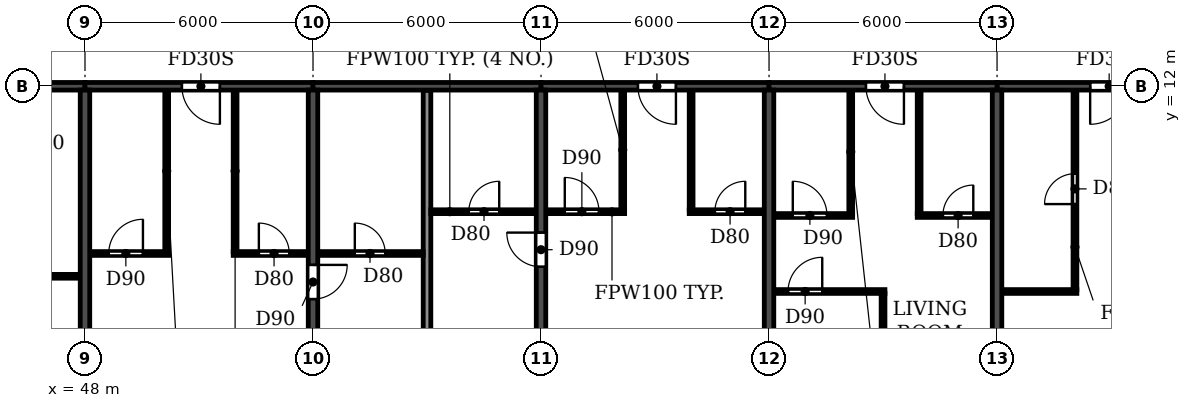
"""IFC4 building model, lengths in metres.
Left out: names, types, materials, properties, quantities, classifications, styles, units other than length and angle.
Written with IfcOpenShell. Run it as: python <this file> out.ifc"""

import sys

from ifc_helpers import new_model, si_unit, direction, frame, frame_2d, origin, place, context, subcontext, project, spatial, rectangle, extrude, element, fill, save


model = new_model("IFC4")
c1 = context("Model", 3, precision=1e-05, world=origin(), true_north=direction((0.0, 1.0)))
c2 = subcontext(c1, "Body", "Model", "MODEL_VIEW")
j1 = project(units=[si_unit("LENGTHUNIT", "METRE"), si_unit("PLANEANGLEUNIT", "RADIAN")], contexts=[c1])
p1 = place(None, origin())
s1 = spatial("IfcSite", under=j1, at=p1, CompositionType="ELEMENT")
p2 = place(p1, origin())
s2 = spatial("IfcBuilding", under=s1, at=p2, CompositionType="ELEMENT")
p3 = place(p2, frame((0.0, 0.0, 257.7)))
s3 = spatial("IfcBuildingStorey", under=s2, at=p3, CompositionType="ELEMENT", Elevation=257.7)
p4 = place(p3, frame((48.0, 0.2, 0.0), z_axis=(0.0, 0.0, 1.0), x_axis=(0.0, 1.0, 0.0)))
e1 = element("IfcWall", 1, at=p4, inside=s3, PredefinedType="SHEAR", context=c2, shape_type="SweptSolid", body=[
    extrude(rectangle(XDim=11.7, YDim=0.25, at=frame_2d((5.85, 0.0))), origin(), (0.0, 0.0, 1.0), 3.0),
])
p5 = place(p3, frame((54.0, 0.2, 0.0), z_axis=(0.0, 0.0, 1.0), x_axis=(0.0, 1.0, 0.0)))
e2 = element("IfcWall", 2, at=p5, inside=s3, PredefinedType="SHEAR", context=c2, shape_type="SweptSolid", body=[
    extrude(rectangle(XDim=11.7, YDim=0.25, at=frame_2d((5.85, 0.0))), origin(), (0.0, 0.0, 1.0), 3.0),
])
p6 = place(p5, frame((6.2, 0.0, 0.0)))
e3 = element("IfcOpeningElement", 3, at=p6, cuts=e2, PredefinedType="OPENING", context=c2, shape_type="SweptSolid", body=[
    extrude(rectangle(XDim=0.9, YDim=2.1, at=frame_2d((0.45, 1.05))), frame((0.0, 0.135, 0.0), z_axis=(0.0, -1.0, 0.0), x_axis=(1.0, 0.0, 0.0)), (0.0, 0.0, 1.0), 0.27),
])
p7 = place(p3, frame((60.0, 0.2, 0.0), z_axis=(0.0, 0.0, 1.0), x_axis=(0.0, 1.0, 0.0)))
e4 = element("IfcWall", 4, at=p7, inside=s3, PredefinedType="SHEAR", context=c2, shape_type="SweptSolid", body=[
    extrude(rectangle(XDim=11.7, YDim=0.25, at=frame_2d((5.85, 0.0))), origin(), (0.0, 0.0, 1.0), 3.0),
])
p8 = place(p7, frame((7.05, 0.0, 0.0)))
e5 = element("IfcOpeningElement", 5, at=p8, cuts=e4, PredefinedType="OPENING", context=c2, shape_type="SweptSolid", body=[
    extrude(rectangle(XDim=0.9, YDim=2.1, at=frame_2d((0.45, 1.05))), frame((0.0, 0.135, 0.0), z_axis=(0.0, -1.0, 0.0), x_axis=(1.0, 0.0, 0.0)), (0.0, 0.0, 1.0), 0.27),
])
for number, where, z_axis, x_axis in (
    (6, (66.0, 0.2, 0.0), (0.0, 0.0, 1.0), (0.0, 1.0, 0.0)),
    (7, (72.0, 0.2, 0.0), (0.0, 0.0, 1.0), (0.0, 1.0, 0.0)),
):
    element("IfcWall", number, at=place(p3, frame(where, z_axis=z_axis, x_axis=x_axis)), inside=s3, PredefinedType="SHEAR", context=c2, shape_type="SweptSolid", body=[
        extrude(rectangle(XDim=11.7, YDim=0.25, at=frame_2d((5.85, 0.0))), origin(), (0.0, 0.0, 1.0), 3.0),
    ])
p9 = place(p3, frame((42.0, 12.0, 0.0), z_axis=(0.0, 0.0, 1.0), x_axis=(1.0, 0.0, 0.0)))
e8 = element("IfcWall", 8, at=p9, inside=s3, PredefinedType="SHEAR", context=c2, shape_type="SweptSolid", body=[
    extrude(rectangle(XDim=6.0, YDim=0.2, at=frame_2d((3.0, 0.0))), origin(), (0.0, 0.0, 1.0), 2.4),
])
p10 = place(p9, frame((2.55, 0.0, 0.0)))
e9 = element("IfcOpeningElement", 9, at=p10, cuts=e8, PredefinedType="OPENING", context=c2, shape_type="SweptSolid", body=[
    extrude(rectangle(XDim=1.0, YDim=2.1, at=frame_2d((0.5, 1.05))), frame((0.0, 0.11, 0.0), z_axis=(0.0, -1.0, 0.0), x_axis=(1.0, 0.0, 0.0)), (0.0, 0.0, 1.0), 0.22),
])
p11 = place(p3, frame((48.0, 12.0, 0.0), z_axis=(0.0, 0.0, 1.0), x_axis=(1.0, 0.0, 0.0)))
e10 = element("IfcWall", 10, at=p11, inside=s3, PredefinedType="SHEAR", context=c2, shape_type="SweptSolid", body=[
    extrude(rectangle(XDim=6.0, YDim=0.2, at=frame_2d((3.0, 0.0))), origin(), (0.0, 0.0, 1.0), 2.4),
])
p12 = place(p11, frame((2.55, 0.0, 0.0)))
e11 = element("IfcOpeningElement", 11, at=p12, cuts=e10, PredefinedType="OPENING", context=c2, shape_type="SweptSolid", body=[
    extrude(rectangle(XDim=1.0, YDim=2.1, at=frame_2d((0.5, 1.05))), frame((0.0, 0.11, 0.0), z_axis=(0.0, -1.0, 0.0), x_axis=(1.0, 0.0, 0.0)), (0.0, 0.0, 1.0), 0.22),
])
p13 = place(p3, frame((54.0, 12.0, 0.0), z_axis=(0.0, 0.0, 1.0), x_axis=(1.0, 0.0, 0.0)))
e12 = element("IfcWall", 12, at=p13, inside=s3, PredefinedType="SHEAR", context=c2, shape_type="SweptSolid", body=[
    extrude(rectangle(XDim=6.0, YDim=0.2, at=frame_2d((3.0, 0.0))), origin(), (0.0, 0.0, 1.0), 2.4),
])
p14 = place(p3, frame((60.0, 12.0, 0.0), z_axis=(0.0, 0.0, 1.0), x_axis=(1.0, 0.0, 0.0)))
e13 = element("IfcWall", 13, at=p14, inside=s3, PredefinedType="SHEAR", context=c2, shape_type="SweptSolid", body=[
    extrude(rectangle(XDim=6.0, YDim=0.2, at=frame_2d((3.0, 0.0))), origin(), (0.0, 0.0, 1.0), 2.4),
])
p15 = place(p14, frame((2.55, 0.0, 0.0)))
e14 = element("IfcOpeningElement", 14, at=p15, cuts=e13, PredefinedType="OPENING", context=c2, shape_type="SweptSolid", body=[
    extrude(rectangle(XDim=1.0, YDim=2.1, at=frame_2d((0.5, 1.05))), frame((0.0, 0.11, 0.0), z_axis=(0.0, -1.0, 0.0), x_axis=(1.0, 0.0, 0.0)), (0.0, 0.0, 1.0), 0.22),
])
p16 = place(p3, frame((66.0, 12.0, 0.0), z_axis=(0.0, 0.0, 1.0), x_axis=(1.0, 0.0, 0.0)))
e15 = element("IfcWall", 15, at=p16, inside=s3, PredefinedType="SHEAR", context=c2, shape_type="SweptSolid", body=[
    extrude(rectangle(XDim=6.0, YDim=0.2, at=frame_2d((3.0, 0.0))), origin(), (0.0, 0.0, 1.0), 2.4),
])
p17 = place(p16, frame((2.55, 0.0, 0.0)))
e16 = element("IfcOpeningElement", 16, at=p17, cuts=e15, PredefinedType="OPENING", context=c2, shape_type="SweptSolid", body=[
    extrude(rectangle(XDim=1.0, YDim=2.1, at=frame_2d((0.5, 1.05))), frame((0.0, 0.11, 0.0), z_axis=(0.0, -1.0, 0.0), x_axis=(1.0, 0.0, 0.0)), (0.0, 0.0, 1.0), 0.22),
])
p18 = place(p3, frame((72.0, 12.0, 0.0), z_axis=(0.0, 0.0, 1.0), x_axis=(1.0, 0.0, 0.0)))
e17 = element("IfcWall", 17, at=p18, inside=s3, PredefinedType="SHEAR", context=c2, shape_type="SweptSolid", body=[
    extrude(rectangle(XDim=6.0, YDim=0.2, at=frame_2d((3.0, 0.0))), origin(), (0.0, 0.0, 1.0), 2.4),
])
p19 = place(p18, frame((2.45, 0.0, 0.0)))
e18 = element("IfcOpeningElement", 18, at=p19, cuts=e17, PredefinedType="OPENING", context=c2, shape_type="SweptSolid", body=[
    extrude(rectangle(XDim=1.0, YDim=2.1, at=frame_2d((0.5, 1.05))), frame((0.0, 0.11, 0.0), z_axis=(0.0, -1.0, 0.0), x_axis=(1.0, 0.0, 0.0)), (0.0, 0.0, 1.0), 0.22),
])
p20 = place(p3, frame((57.0, 0.06, 0.0), z_axis=(0.0, 0.0, 1.0), x_axis=(0.0, 1.0, 0.0)))
e19 = element("IfcWall", 19, at=p20, inside=s3, PredefinedType="PARTITIONING", context=c2, shape_type="SweptSolid", body=[
    extrude(rectangle(XDim=11.83, YDim=0.2, at=frame_2d((5.915, 0.0))), origin(), (0.0, 0.0, 1.0), 3.0),
])
p21 = place(p3, frame((66.135, 6.6, 0.0), z_axis=(0.0, 0.0, 1.0), x_axis=(1.0, 0.0, 0.0)))
e20 = element("IfcWall", 20, at=p21, inside=s3, PredefinedType="PARTITIONING", context=c2, shape_type="SweptSolid", body=[
    extrude(rectangle(XDim=2.915, YDim=0.1, at=frame_2d((1.458, 0.0))), origin(), (0.0, 0.0, 1.0), 3.0),
])
p22 = place(p21, frame((0.365, 0.0, 0.0)))
e21 = element("IfcOpeningElement", 21, at=p22, cuts=e20, PredefinedType="OPENING", context=c2, shape_type="SweptSolid", body=[
    extrude(rectangle(XDim=0.9, YDim=2.1, at=frame_2d((0.45, 1.05))), frame((0.0, 0.06, 0.0), z_axis=(0.0, -1.0, 0.0), x_axis=(1.0, 0.0, 0.0)), (0.0, 0.0, 1.0), 0.12),
])
for number, where, z_axis, x_axis in (
    (22, (72.135, 6.6, 0.0), (0.0, 0.0, 1.0), (1.0, 0.0, 0.0)),
    (23, (45.9, 7.0, 0.0), (0.0, 0.0, 1.0), (1.0, 0.0, 0.0)),
):
    element("IfcWall", number, at=place(p3, frame(where, z_axis=z_axis, x_axis=x_axis)), inside=s3, PredefinedType="PARTITIONING", context=c2, shape_type="SweptSolid", body=[
        extrude(rectangle(XDim=1.965, YDim=0.1, at=frame_2d((0.982, 0.0))), origin(), (0.0, 0.0, 1.0), 3.0),
    ])
p23 = place(p3, frame((48.135, 7.6, 0.0), z_axis=(0.0, 0.0, 1.0), x_axis=(1.0, 0.0, 0.0)))
e24 = element("IfcWall", 24, at=p23, inside=s3, PredefinedType="PARTITIONING", context=c2, shape_type="SweptSolid", body=[
    extrude(rectangle(XDim=2.065, YDim=0.1, at=frame_2d((1.032, 0.0))), origin(), (0.0, 0.0, 1.0), 3.0),
])
p24 = place(p23, frame((0.49, 0.0, 0.0)))
e25 = element("IfcOpeningElement", 25, at=p24, cuts=e24, PredefinedType="OPENING", context=c2, shape_type="SweptSolid", body=[
    extrude(rectangle(XDim=0.9, YDim=2.1, at=frame_2d((0.45, 1.05))), frame((0.0, 0.06, 0.0), z_axis=(0.0, -1.0, 0.0), x_axis=(1.0, 0.0, 0.0)), (0.0, 0.0, 1.0), 0.12),
])
p25 = place(p3, frame((51.9, 7.6, 0.0), z_axis=(0.0, 0.0, 1.0), x_axis=(1.0, 0.0, 0.0)))
e26 = element("IfcWall", 26, at=p25, inside=s3, PredefinedType="PARTITIONING", context=c2, shape_type="SweptSolid", body=[
    extrude(rectangle(XDim=1.965, YDim=0.1, at=frame_2d((0.982, 0.0))), origin(), (0.0, 0.0, 1.0), 3.0),
])
p26 = place(p25, frame((0.675, 0.0, 0.0)))
e27 = element("IfcOpeningElement", 27, at=p26, cuts=e26, PredefinedType="OPENING", context=c2, shape_type="SweptSolid", body=[
    extrude(rectangle(XDim=0.8, YDim=2.1, at=frame_2d((0.4, 1.05))), frame((0.0, 0.06, 0.0), z_axis=(0.0, -1.0, 0.0), x_axis=(1.0, 0.0, 0.0)), (0.0, 0.0, 1.0), 0.12),
])
p27 = place(p3, frame((54.135, 7.6, 0.0), z_axis=(0.0, 0.0, 1.0), x_axis=(1.0, 0.0, 0.0)))
e28 = element("IfcWall", 28, at=p27, inside=s3, PredefinedType="PARTITIONING", context=c2, shape_type="SweptSolid", body=[
    extrude(rectangle(XDim=2.765, YDim=0.1, at=frame_2d((1.382, 0.0))), origin(), (0.0, 0.0, 1.0), 3.0),
])
p28 = place(p27, frame((0.965, 0.0, 0.0)))
e29 = element("IfcOpeningElement", 29, at=p28, cuts=e28, PredefinedType="OPENING", context=c2, shape_type="SweptSolid", body=[
    extrude(rectangle(XDim=0.8, YDim=2.1, at=frame_2d((0.4, 1.05))), frame((0.0, 0.06, 0.0), z_axis=(0.0, -1.0, 0.0), x_axis=(1.0, 0.0, 0.0)), (0.0, 0.0, 1.0), 0.12),
])
p29 = place(p3, frame((66.135, 8.6, 0.0), z_axis=(0.0, 0.0, 1.0), x_axis=(1.0, 0.0, 0.0)))
e30 = element("IfcWall", 30, at=p29, inside=s3, PredefinedType="PARTITIONING", context=c2, shape_type="SweptSolid", body=[
    extrude(rectangle(XDim=2.065, YDim=0.1, at=frame_2d((1.032, 0.0))), origin(), (0.0, 0.0, 1.0), 3.0),
])
p30 = place(p29, frame((0.49, 0.0, 0.0)))
e31 = element("IfcOpeningElement", 31, at=p30, cuts=e30, PredefinedType="OPENING", context=c2, shape_type="SweptSolid", body=[
    extrude(rectangle(XDim=0.9, YDim=2.1, at=frame_2d((0.45, 1.05))), frame((0.0, 0.06, 0.0), z_axis=(0.0, -1.0, 0.0), x_axis=(1.0, 0.0, 0.0)), (0.0, 0.0, 1.0), 0.12),
])
p31 = place(p3, frame((69.9, 8.6, 0.0), z_axis=(0.0, 0.0, 1.0), x_axis=(1.0, 0.0, 0.0)))
e32 = element("IfcWall", 32, at=p31, inside=s3, PredefinedType="PARTITIONING", context=c2, shape_type="SweptSolid", body=[
    extrude(rectangle(XDim=1.965, YDim=0.1, at=frame_2d((0.982, 0.0))), origin(), (0.0, 0.0, 1.0), 3.0),
])
p32 = place(p31, frame((0.675, 0.0, 0.0)))
e33 = element("IfcOpeningElement", 33, at=p32, cuts=e32, PredefinedType="OPENING", context=c2, shape_type="SweptSolid", body=[
    extrude(rectangle(XDim=0.8, YDim=2.1, at=frame_2d((0.4, 1.05))), frame((0.0, 0.06, 0.0), z_axis=(0.0, -1.0, 0.0), x_axis=(1.0, 0.0, 0.0)), (0.0, 0.0, 1.0), 0.12),
])
p33 = place(p3, frame((57.1, 8.7, 0.0), z_axis=(0.0, 0.0, 1.0), x_axis=(1.0, 0.0, 0.0)))
e34 = element("IfcWall", 34, at=p33, inside=s3, PredefinedType="PARTITIONING", context=c2, shape_type="SweptSolid", body=[
    extrude(rectangle(XDim=2.765, YDim=0.1, at=frame_2d((1.382, 0.0))), origin(), (0.0, 0.0, 1.0), 3.0),
])
p34 = place(p33, frame((1.0, 0.0, 0.0)))
e35 = element("IfcOpeningElement", 35, at=p34, cuts=e34, PredefinedType="OPENING", context=c2, shape_type="SweptSolid", body=[
    extrude(rectangle(XDim=0.8, YDim=2.1, at=frame_2d((0.4, 1.05))), frame((0.0, 0.06, 0.0), z_axis=(0.0, -1.0, 0.0), x_axis=(1.0, 0.0, 0.0)), (0.0, 0.0, 1.0), 0.12),
])
p35 = place(p3, frame((60.135, 8.7, 0.0), z_axis=(0.0, 0.0, 1.0), x_axis=(1.0, 0.0, 0.0)))
e36 = element("IfcWall", 36, at=p35, inside=s3, PredefinedType="PARTITIONING", context=c2, shape_type="SweptSolid", body=[
    extrude(rectangle(XDim=2.065, YDim=0.1, at=frame_2d((1.032, 0.0))), origin(), (0.0, 0.0, 1.0), 3.0),
])
p36 = place(p35, frame((0.49, 0.0, 0.0)))
e37 = element("IfcOpeningElement", 37, at=p36, cuts=e36, PredefinedType="OPENING", context=c2, shape_type="SweptSolid", body=[
    extrude(rectangle(XDim=0.9, YDim=2.1, at=frame_2d((0.45, 1.05))), frame((0.0, 0.06, 0.0), z_axis=(0.0, -1.0, 0.0), x_axis=(1.0, 0.0, 0.0)), (0.0, 0.0, 1.0), 0.12),
])
p37 = place(p3, frame((63.9, 8.7, 0.0), z_axis=(0.0, 0.0, 1.0), x_axis=(1.0, 0.0, 0.0)))
e38 = element("IfcWall", 38, at=p37, inside=s3, PredefinedType="PARTITIONING", context=c2, shape_type="SweptSolid", body=[
    extrude(rectangle(XDim=1.965, YDim=0.1, at=frame_2d((0.982, 0.0))), origin(), (0.0, 0.0, 1.0), 3.0),
])
p38 = place(p37, frame((0.675, 0.0, 0.0)))
e39 = element("IfcOpeningElement", 39, at=p38, cuts=e38, PredefinedType="OPENING", context=c2, shape_type="SweptSolid", body=[
    extrude(rectangle(XDim=0.8, YDim=2.1, at=frame_2d((0.4, 1.05))), frame((0.0, 0.06, 0.0), z_axis=(0.0, -1.0, 0.0), x_axis=(1.0, 0.0, 0.0)), (0.0, 0.0, 1.0), 0.12),
])
for number, where, z_axis, x_axis in (
    (40, (50.15, 7.65, 0.0), (0.0, 0.0, 1.0), (0.0, 1.0, 0.0)),
    (41, (51.95, 7.65, 0.0), (0.0, 0.0, 1.0), (0.0, 1.0, 0.0)),
):
    element("IfcWall", number, at=place(p3, frame(where, z_axis=z_axis, x_axis=x_axis)), inside=s3, PredefinedType="PARTITIONING", context=c2, shape_type="SweptSolid", body=[
        extrude(rectangle(XDim=4.24, YDim=0.1, at=frame_2d((2.12, 0.0))), origin(), (0.0, 0.0, 1.0), 3.0),
    ])
for number, where, z_axis, x_axis in (
    (42, (62.15, 8.75, 0.0), (0.0, 0.0, 1.0), (0.0, 1.0, 0.0)),
    (43, (63.95, 8.75, 0.0), (0.0, 0.0, 1.0), (0.0, 1.0, 0.0)),
):
    element("IfcWall", number, at=place(p3, frame(where, z_axis=z_axis, x_axis=x_axis)), inside=s3, PredefinedType="PARTITIONING", context=c2, shape_type="SweptSolid", body=[
        extrude(rectangle(XDim=3.14, YDim=0.1, at=frame_2d((1.57, 0.0))), origin(), (0.0, 0.0, 1.0), 3.0),
    ])
p39 = place(p3, frame((68.15, 8.65, 0.0), z_axis=(0.0, 0.0, 1.0), x_axis=(0.0, 1.0, 0.0)))
e44 = element("IfcWall", 44, at=p39, inside=s3, PredefinedType="PARTITIONING", context=c2, shape_type="SweptSolid", body=[
    extrude(rectangle(XDim=3.24, YDim=0.1, at=frame_2d((1.62, 0.0))), origin(), (0.0, 0.0, 1.0), 3.0),
])
p40 = place(p3, frame((69.0, 0.06, 0.0), z_axis=(0.0, 0.0, 1.0), x_axis=(0.0, 1.0, 0.0)))
e45 = element("IfcWall", 45, at=p40, inside=s3, PredefinedType="PARTITIONING", context=c2, shape_type="SweptSolid", body=[
    extrude(rectangle(XDim=6.49, YDim=0.1, at=frame_2d((3.245, 0.0))), origin(), (0.0, 0.0, 1.0), 3.0),
])
p41 = place(p3, frame((69.95, 8.65, 0.0), z_axis=(0.0, 0.0, 1.0), x_axis=(0.0, 1.0, 0.0)))
e46 = element("IfcWall", 46, at=p41, inside=s3, PredefinedType="PARTITIONING", context=c2, shape_type="SweptSolid", body=[
    extrude(rectangle(XDim=3.24, YDim=0.1, at=frame_2d((1.62, 0.0))), origin(), (0.0, 0.0, 1.0), 3.0),
])
p42 = place(p3, frame((74.05, 6.65, 0.0), z_axis=(0.0, 0.0, 1.0), x_axis=(0.0, 1.0, 0.0)))
e47 = element("IfcWall", 47, at=p42, inside=s3, PredefinedType="PARTITIONING", context=c2, shape_type="SweptSolid", body=[
    extrude(rectangle(XDim=5.24, YDim=0.1, at=frame_2d((2.62, 0.0))), origin(), (0.0, 0.0, 1.0), 3.0),
])
p43 = place(p42, frame((2.25, 0.0, 0.0)))
e48 = element("IfcOpeningElement", 48, at=p43, cuts=e47, PredefinedType="OPENING", context=c2, shape_type="SweptSolid", body=[
    extrude(rectangle(XDim=0.8, YDim=2.1, at=frame_2d((0.4, 1.05))), frame((0.0, 0.06, 0.0), z_axis=(0.0, -1.0, 0.0), x_axis=(1.0, 0.0, 0.0)), (0.0, 0.0, 1.0), 0.12),
])
p44 = place(p28, origin())
e49 = element("IfcDoor", 49, at=p44, inside=s3, OperationType="SINGLE_SWING_LEFT", PredefinedType="DOOR", context=c2, shape_type="SweptSolid", body=[
    extrude(rectangle(XDim=0.8, YDim=2.1, at=frame_2d((0.4, 1.05))), frame((0.0, 0.025, 0.0), z_axis=(0.0, -1.0, 0.0), x_axis=(1.0, 0.0, 0.0)), (0.0, 0.0, 1.0), 0.05),
])
fill(e29, e49)
p45 = place(p24, origin())
e50 = element("IfcDoor", 50, at=p45, inside=s3, OperationType="SINGLE_SWING_RIGHT", PredefinedType="DOOR", context=c2, shape_type="SweptSolid", body=[
    extrude(rectangle(XDim=0.9, YDim=2.1, at=frame_2d((0.45, 1.05))), frame((0.0, 0.025, 0.0), z_axis=(0.0, -1.0, 0.0), x_axis=(1.0, 0.0, 0.0)), (0.0, 0.0, 1.0), 0.05),
])
fill(e25, e50)
p46 = place(p12, frame((1.0, 0.0, 0.0), z_axis=(0.0, 0.0, 1.0), x_axis=(-1.0, 0.0, 0.0)))
e51 = element("IfcDoor", 51, at=p46, inside=s3, OperationType="SINGLE_SWING_LEFT", PredefinedType="DOOR", context=c2, shape_type="SweptSolid", body=[
    extrude(rectangle(XDim=1.0, YDim=2.1, at=frame_2d((0.5, 1.05))), frame((0.0, 0.025, 0.0), z_axis=(0.0, -1.0, 0.0), x_axis=(1.0, 0.0, 0.0)), (0.0, 0.0, 1.0), 0.05),
])
fill(e11, e51)
p47 = place(p26, origin())
e52 = element("IfcDoor", 52, at=p47, inside=s3, OperationType="SINGLE_SWING_LEFT", PredefinedType="DOOR", context=c2, shape_type="SweptSolid", body=[
    extrude(rectangle(XDim=0.8, YDim=2.1, at=frame_2d((0.4, 1.05))), frame((0.0, 0.025, 0.0), z_axis=(0.0, -1.0, 0.0), x_axis=(1.0, 0.0, 0.0)), (0.0, 0.0, 1.0), 0.05),
])
fill(e27, e52)
p48 = place(p6, frame((0.9, 0.0, 0.0), z_axis=(0.0, 0.0, 1.0), x_axis=(-1.0, 0.0, 0.0)))
e53 = element("IfcDoor", 53, at=p48, inside=s3, OperationType="SINGLE_SWING_LEFT", PredefinedType="DOOR", context=c2, shape_type="SweptSolid", body=[
    extrude(rectangle(XDim=0.9, YDim=2.1, at=frame_2d((0.45, 1.05))), frame((0.0, 0.025, 0.0), z_axis=(0.0, -1.0, 0.0), x_axis=(1.0, 0.0, 0.0)), (0.0, 0.0, 1.0), 0.05),
])
fill(e3, e53)
p49 = place(p34, origin())
e54 = element("IfcDoor", 54, at=p49, inside=s3, OperationType="SINGLE_SWING_RIGHT", PredefinedType="DOOR", context=c2, shape_type="SweptSolid", body=[
    extrude(rectangle(XDim=0.8, YDim=2.1, at=frame_2d((0.4, 1.05))), frame((0.0, 0.025, 0.0), z_axis=(0.0, -1.0, 0.0), x_axis=(1.0, 0.0, 0.0)), (0.0, 0.0, 1.0), 0.05),
])
fill(e35, e54)
p50 = place(p8, origin())
e55 = element("IfcDoor", 55, at=p50, inside=s3, OperationType="SINGLE_SWING_RIGHT", PredefinedType="DOOR", context=c2, shape_type="SweptSolid", body=[
    extrude(rectangle(XDim=0.9, YDim=2.1, at=frame_2d((0.45, 1.05))), frame((0.0, 0.025, 0.0), z_axis=(0.0, -1.0, 0.0), x_axis=(1.0, 0.0, 0.0)), (0.0, 0.0, 1.0), 0.05),
])
fill(e5, e55)
p51 = place(p36, origin())
e56 = element("IfcDoor", 56, at=p51, inside=s3, OperationType="SINGLE_SWING_LEFT", PredefinedType="DOOR", context=c2, shape_type="SweptSolid", body=[
    extrude(rectangle(XDim=0.9, YDim=2.1, at=frame_2d((0.45, 1.05))), frame((0.0, 0.025, 0.0), z_axis=(0.0, -1.0, 0.0), x_axis=(1.0, 0.0, 0.0)), (0.0, 0.0, 1.0), 0.05),
])
fill(e37, e56)
p52 = place(p15, frame((1.0, 0.0, 0.0), z_axis=(0.0, 0.0, 1.0), x_axis=(-1.0, 0.0, 0.0)))
e57 = element("IfcDoor", 57, at=p52, inside=s3, OperationType="SINGLE_SWING_LEFT", PredefinedType="DOOR", context=c2, shape_type="SweptSolid", body=[
    extrude(rectangle(XDim=1.0, YDim=2.1, at=frame_2d((0.5, 1.05))), frame((0.0, 0.025, 0.0), z_axis=(0.0, -1.0, 0.0), x_axis=(1.0, 0.0, 0.0)), (0.0, 0.0, 1.0), 0.05),
])
fill(e14, e57)
p53 = place(p38, origin())
e58 = element("IfcDoor", 58, at=p53, inside=s3, OperationType="SINGLE_SWING_RIGHT", PredefinedType="DOOR", context=c2, shape_type="SweptSolid", body=[
    extrude(rectangle(XDim=0.8, YDim=2.1, at=frame_2d((0.4, 1.05))), frame((0.0, 0.025, 0.0), z_axis=(0.0, -1.0, 0.0), x_axis=(1.0, 0.0, 0.0)), (0.0, 0.0, 1.0), 0.05),
])
fill(e39, e58)
p54 = place(p22, origin())
e59 = element("IfcDoor", 59, at=p54, inside=s3, OperationType="SINGLE_SWING_RIGHT", PredefinedType="DOOR", context=c2, shape_type="SweptSolid", body=[
    extrude(rectangle(XDim=0.9, YDim=2.1, at=frame_2d((0.45, 1.05))), frame((0.0, 0.025, 0.0), z_axis=(0.0, -1.0, 0.0), x_axis=(1.0, 0.0, 0.0)), (0.0, 0.0, 1.0), 0.05),
])
fill(e21, e59)
p55 = place(p30, origin())
e60 = element("IfcDoor", 60, at=p55, inside=s3, OperationType="SINGLE_SWING_LEFT", PredefinedType="DOOR", context=c2, shape_type="SweptSolid", body=[
    extrude(rectangle(XDim=0.9, YDim=2.1, at=frame_2d((0.45, 1.05))), frame((0.0, 0.025, 0.0), z_axis=(0.0, -1.0, 0.0), x_axis=(1.0, 0.0, 0.0)), (0.0, 0.0, 1.0), 0.05),
])
fill(e31, e60)
p56 = place(p17, frame((1.0, 0.0, 0.0), z_axis=(0.0, 0.0, 1.0), x_axis=(-1.0, 0.0, 0.0)))
e61 = element("IfcDoor", 61, at=p56, inside=s3, OperationType="SINGLE_SWING_LEFT", PredefinedType="DOOR", context=c2, shape_type="SweptSolid", body=[
    extrude(rectangle(XDim=1.0, YDim=2.1, at=frame_2d((0.5, 1.05))), frame((0.0, 0.025, 0.0), z_axis=(0.0, -1.0, 0.0), x_axis=(1.0, 0.0, 0.0)), (0.0, 0.0, 1.0), 0.05),
])
fill(e16, e61)
p57 = place(p32, origin())
e62 = element("IfcDoor", 62, at=p57, inside=s3, OperationType="SINGLE_SWING_RIGHT", PredefinedType="DOOR", context=c2, shape_type="SweptSolid", body=[
    extrude(rectangle(XDim=0.8, YDim=2.1, at=frame_2d((0.4, 1.05))), frame((0.0, 0.025, 0.0), z_axis=(0.0, -1.0, 0.0), x_axis=(1.0, 0.0, 0.0)), (0.0, 0.0, 1.0), 0.05),
])
fill(e33, e62)
p58 = place(p43, origin())
e63 = element("IfcDoor", 63, at=p58, inside=s3, OperationType="SINGLE_SWING_LEFT", PredefinedType="DOOR", context=c2, shape_type="SweptSolid", body=[
    extrude(rectangle(XDim=0.8, YDim=2.1, at=frame_2d((0.4, 1.05))), frame((0.0, 0.025, 0.0), z_axis=(0.0, -1.0, 0.0), x_axis=(1.0, 0.0, 0.0)), (0.0, 0.0, 1.0), 0.05),
])
fill(e48, e63)
p59 = place(p19, frame((1.0, 0.0, 0.0), z_axis=(0.0, 0.0, 1.0), x_axis=(-1.0, 0.0, 0.0)))
e64 = element("IfcDoor", 64, at=p59, inside=s3, OperationType="SINGLE_SWING_RIGHT", PredefinedType="DOOR", context=c2, shape_type="SweptSolid", body=[
    extrude(rectangle(XDim=1.0, YDim=2.1, at=frame_2d((0.5, 1.05))), frame((0.0, 0.025, 0.0), z_axis=(0.0, -1.0, 0.0), x_axis=(1.0, 0.0, 0.0)), (0.0, 0.0, 1.0), 0.05),
])
fill(e18, e64)
save(model, sys.argv[1])
